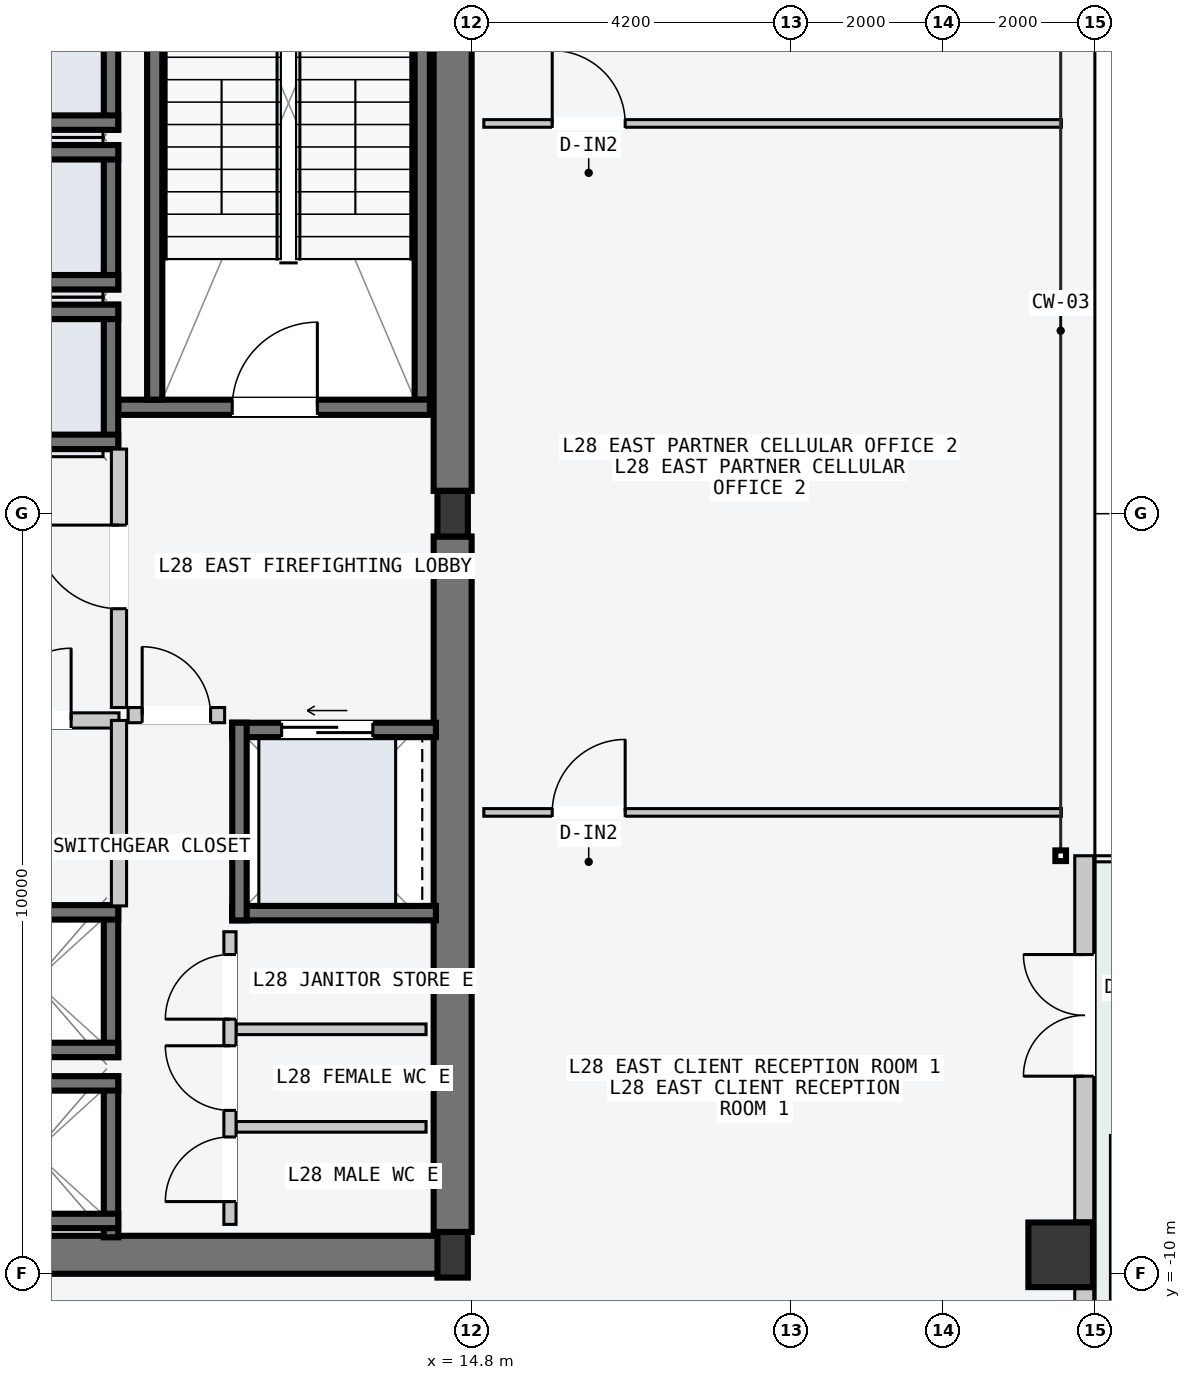
"""IFC4 building model, lengths in metres.
Left out: names, types, materials, properties, quantities, classifications, styles, units other than length and angle.
Written with IfcOpenShell. Run it as: python <this file> out.ifc"""

import sys

from ifc_helpers import new_model, si_unit, direction, frame, frame_2d, origin, origin_2d, place, context, subcontext, project, spatial, rectangle, hollow_rectangle, i_section, extrude, element, fill, save


model = new_model("IFC4")
c1 = context("Model", 3, precision=1e-05, world=origin(), true_north=direction((0.0, 1.0)))
c2 = subcontext(c1, "Body", "Model", "MODEL_VIEW")
j1 = project(units=[si_unit("LENGTHUNIT", "METRE"), si_unit("PLANEANGLEUNIT", "RADIAN")], contexts=[c1])
p1 = place(None, origin())
s1 = spatial("IfcSite", under=j1, at=p1, CompositionType="ELEMENT")
p2 = place(p1, origin())
s2 = spatial("IfcBuilding", under=s1, at=p2, CompositionType="ELEMENT")
p3 = place(p2, frame((0.0, 0.0, 109.8)))
s3 = spatial("IfcBuildingStorey", under=s2, at=p3, CompositionType="ELEMENT", Elevation=109.8)
p4 = place(p3, frame((8.07, -9.75, -0.2), z_axis=(0.0, 0.0, 1.0), x_axis=(1.0, 0.0, 0.0)))
e1 = element("IfcWall", 1, at=p4, inside=s3, PredefinedType="SHEAR", context=c2, shape_type="SweptSolid", body=[
    extrude(rectangle(XDim=6.46, YDim=0.5, at=frame_2d((3.23, 0.0))), origin(), (0.0, 0.0, 1.0), 3.6),
])
for number, where, z_axis, x_axis in (
    (2, (14.55, -9.45, -0.2), (0.0, 0.0, 1.0), (0.0, 1.0, 0.0)),
    (3, (14.55, 0.3, -0.2), (0.0, 0.0, 1.0), (0.0, 1.0, 0.0)),
):
    element("IfcWall", number, at=place(p3, frame(where, z_axis=z_axis, x_axis=x_axis)), inside=s3, PredefinedType="SHEAR", context=c2, shape_type="SweptSolid", body=[
        extrude(rectangle(XDim=9.15, YDim=0.5, at=frame_2d((4.575, 0.0))), origin(), (0.0, 0.0, 1.0), 3.6),
    ])
p5 = place(p3, frame((14.15, 1.5, -0.2), z_axis=(0.0, 0.0, 1.0), x_axis=(0.0, 1.0, 0.0)))
e4 = element("IfcWall", 4, at=p5, inside=s3, PredefinedType="SOLIDWALL", context=c2, shape_type="SweptSolid", body=[
    extrude(rectangle(XDim=7.8, YDim=0.2, at=frame_2d((3.9, 0.0))), origin(), (0.0, 0.0, 1.0), 3.6),
])
p6 = place(p3, frame((10.15, 1.4, -0.2), z_axis=(0.0, 0.0, 1.0), x_axis=(1.0, 0.0, 0.0)))
e5 = element("IfcWall", 5, at=p6, inside=s3, PredefinedType="SOLIDWALL", context=c2, shape_type="SweptSolid", body=[
    extrude(rectangle(XDim=4.1, YDim=0.2, at=frame_2d((2.05, 0.0))), origin(), (0.0, 0.0, 1.0), 3.6),
])
p7 = place(p6, frame((1.5, 0.0, 0.2)))
e6 = element("IfcOpeningElement", 6, at=p7, cuts=e5, PredefinedType="OPENING", context=c2, shape_type="SweptSolid", body=[
    extrude(rectangle(XDim=1.12, YDim=2.18, at=frame_2d((0.56, 1.09))), frame((0.0, 0.11, 0.0), z_axis=(0.0, -1.0, 0.0), x_axis=(1.0, 0.0, 0.0)), (0.0, 0.0, 1.0), 0.22),
])
p8 = place(p3, frame((10.63, 1.5, -0.2), z_axis=(0.0, 0.0, 1.0), x_axis=(0.0, 1.0, 0.0)))
e7 = element("IfcWall", 7, at=p8, inside=s3, PredefinedType="SOLIDWALL", context=c2, shape_type="SweptSolid", body=[
    extrude(rectangle(XDim=7.8, YDim=0.2, at=frame_2d((3.9, 0.0))), origin(), (0.0, 0.0, 1.0), 3.6),
])
for number, where, z_axis, x_axis in (
    (8, (14.55, -9.75, 0.0), (0.0, 0.0, 1.0), (1.0, 0.0, 0.0)),
    (9, (14.55, 0.0, 0.0), (0.0, 0.0, 1.0), (1.0, 0.0, 0.0)),
):
    element("IfcColumn", number, at=place(p3, frame(where, z_axis=z_axis, x_axis=x_axis)), inside=s3, PredefinedType="COLUMN", context=c2, shape_type="SweptSolid", body=[
        extrude(i_section(OverallWidth=0.4, OverallDepth=0.6, WebThickness=0.022, FlangeThickness=0.036, at=origin_2d()), origin(), (0.0, 0.0, 1.0), 3.6),
    ])
p9 = place(p3, frame((22.55, -9.75, 0.0), z_axis=(0.0, 0.0, 1.0), x_axis=(0.0, 1.0, 0.0)))
e10 = element("IfcColumn", 10, at=p9, inside=s3, PredefinedType="COLUMN", context=c2, shape_type="SweptSolid", body=[
    extrude(hollow_rectangle(XDim=0.85, YDim=0.85, WallThickness=0.04, at=origin_2d()), origin(), (0.0, 0.0, 1.0), 3.6),
])
p10 = place(p3, frame((22.86, -14.605, 0.0), z_axis=(0.0, 0.0, 1.0), x_axis=(0.0, 1.0, 0.0)))
e11 = element("IfcWall", 11, at=p10, inside=s3, PredefinedType="STANDARD", context=c2, shape_type="SweptSolid", body=[
    extrude(rectangle(XDim=4.41, YDim=0.25, at=frame_2d((2.205, 0.0))), origin(), (0.0, 0.0, 1.0), 3.4),
])
p11 = place(p10, frame((1.405, 0.0, 0.85)))
e12 = element("IfcOpeningElement", 12, at=p11, cuts=e11, PredefinedType="OPENING", context=c2, shape_type="SweptSolid", body=[
    extrude(rectangle(XDim=2.0, YDim=2.1, at=frame_2d((1.0, 1.05))), frame((0.0, 0.135, 0.0), z_axis=(0.0, -1.0, 0.0), x_axis=(1.0, 0.0, 0.0)), (0.0, 0.0, 1.0), 0.27),
])
p12 = place(p3, frame((22.86, -9.305, 0.0), z_axis=(0.0, 0.0, 1.0), x_axis=(0.0, 1.0, 0.0)))
e13 = element("IfcWall", 13, at=p12, inside=s3, PredefinedType="STANDARD", context=c2, shape_type="SweptSolid", body=[
    extrude(rectangle(XDim=4.805, YDim=0.25, at=frame_2d((2.402, 0.0))), origin(), (0.0, 0.0, 1.0), 3.4),
])
p13 = place(p12, frame((1.905, 0.0, 0.0)))
e14 = element("IfcOpeningElement", 14, at=p13, cuts=e13, PredefinedType="OPENING", context=c2, shape_type="SweptSolid", body=[
    extrude(rectangle(XDim=1.6, YDim=2.2, at=frame_2d((0.8, 1.1))), frame((0.0, 0.135, 0.0), z_axis=(0.0, -1.0, 0.0), x_axis=(1.0, 0.0, 0.0)), (0.0, 0.0, 1.0), 0.27),
])
p14 = place(p3, frame((10.055, 0.85, -0.2), z_axis=(0.0, 0.0, 1.0), x_axis=(0.0, 1.0, 0.0)))
e15 = element("IfcWall", 15, at=p14, inside=s3, PredefinedType="SOLIDWALL", context=c2, shape_type="SweptSolid", body=[
    extrude(rectangle(XDim=1.9, YDim=0.19, at=frame_2d((0.95, 0.0))), origin(), (0.0, 0.0, 1.0), 3.6),
])
for number, where, z_axis, x_axis in (
    (16, (7.95, 2.655, -0.2), (0.0, 0.0, 1.0), (1.0, 0.0, 0.0)),
    (17, (7.95, 0.945, -0.2), (0.0, 0.0, 1.0), (1.0, 0.0, 0.0)),
):
    element("IfcWall", number, at=place(p3, frame(where, z_axis=z_axis, x_axis=x_axis)), inside=s3, PredefinedType="SOLIDWALL", context=c2, shape_type="SweptSolid", body=[
        extrude(rectangle(XDim=2.2, YDim=0.19, at=frame_2d((1.1, 0.0))), origin(), (0.0, 0.0, 1.0), 3.6),
    ])
p15 = place(p3, frame((10.055, 2.95, -0.2), z_axis=(0.0, 0.0, 1.0), x_axis=(0.0, 1.0, 0.0)))
e18 = element("IfcWall", 18, at=p15, inside=s3, PredefinedType="SOLIDWALL", context=c2, shape_type="SweptSolid", body=[
    extrude(rectangle(XDim=1.9, YDim=0.19, at=frame_2d((0.95, 0.0))), origin(), (0.0, 0.0, 1.0), 3.6),
])
for number, where, z_axis, x_axis in (
    (19, (7.95, 4.755, -0.2), (0.0, 0.0, 1.0), (1.0, 0.0, 0.0)),
    (20, (7.95, 3.045, -0.2), (0.0, 0.0, 1.0), (1.0, 0.0, 0.0)),
):
    element("IfcWall", number, at=place(p3, frame(where, z_axis=z_axis, x_axis=x_axis)), inside=s3, PredefinedType="SOLIDWALL", context=c2, shape_type="SweptSolid", body=[
        extrude(rectangle(XDim=2.2, YDim=0.19, at=frame_2d((1.1, 0.0))), origin(), (0.0, 0.0, 1.0), 3.6),
    ])
p16 = place(p3, frame((10.055, 5.05, -0.2), z_axis=(0.0, 0.0, 1.0), x_axis=(0.0, 1.0, 0.0)))
e21 = element("IfcWall", 21, at=p16, inside=s3, PredefinedType="SOLIDWALL", context=c2, shape_type="SweptSolid", body=[
    extrude(rectangle(XDim=1.9, YDim=0.19, at=frame_2d((0.95, 0.0))), origin(), (0.0, 0.0, 1.0), 3.6),
])
p17 = place(p3, frame((7.95, 5.145, -0.2), z_axis=(0.0, 0.0, 1.0), x_axis=(1.0, 0.0, 0.0)))
e22 = element("IfcWall", 22, at=p17, inside=s3, PredefinedType="SOLIDWALL", context=c2, shape_type="SweptSolid", body=[
    extrude(rectangle(XDim=2.2, YDim=0.19, at=frame_2d((1.1, 0.0))), origin(), (0.0, 0.0, 1.0), 3.6),
])
p18 = place(p3, frame((10.055, -9.52, -0.2), z_axis=(0.0, 0.0, 1.0), x_axis=(0.0, 1.0, 0.0)))
e23 = element("IfcWall", 23, at=p18, inside=s3, PredefinedType="SOLIDWALL", context=c2, shape_type="SweptSolid", body=[
    extrude(rectangle(XDim=2.12, YDim=0.19, at=frame_2d((1.06, 0.0))), origin(), (0.0, 0.0, 1.0), 3.6),
])
for number, where, z_axis, x_axis in (
    (24, (7.95, -7.495, -0.2), (0.0, 0.0, 1.0), (1.0, 0.0, 0.0)),
    (25, (7.95, -9.305, -0.2), (0.0, 0.0, 1.0), (1.0, 0.0, 0.0)),
):
    element("IfcWall", number, at=place(p3, frame(where, z_axis=z_axis, x_axis=x_axis)), inside=s3, PredefinedType="SOLIDWALL", context=c2, shape_type="SweptSolid", body=[
        extrude(rectangle(XDim=2.2, YDim=0.19, at=frame_2d((1.1, 0.0))), origin(), (0.0, 0.0, 1.0), 3.6),
    ])
p19 = place(p3, frame((10.055, -7.15, -0.2), z_axis=(0.0, 0.0, 1.0), x_axis=(0.0, 1.0, 0.0)))
e26 = element("IfcWall", 26, at=p19, inside=s3, PredefinedType="SOLIDWALL", context=c2, shape_type="SweptSolid", body=[
    extrude(rectangle(XDim=2.0, YDim=0.19, at=frame_2d((1.0, 0.0))), origin(), (0.0, 0.0, 1.0), 3.6),
])
for number, where, z_axis, x_axis in (
    (27, (7.95, -5.245, -0.2), (0.0, 0.0, 1.0), (1.0, 0.0, 0.0)),
    (28, (7.95, -7.055, -0.2), (0.0, 0.0, 1.0), (1.0, 0.0, 0.0)),
):
    element("IfcWall", number, at=place(p3, frame(where, z_axis=z_axis, x_axis=x_axis)), inside=s3, PredefinedType="SOLIDWALL", context=c2, shape_type="SweptSolid", body=[
        extrude(rectangle(XDim=2.2, YDim=0.19, at=frame_2d((1.1, 0.0))), origin(), (0.0, 0.0, 1.0), 3.6),
    ])
p20 = place(p3, frame((11.65, -2.845, -0.2), z_axis=(0.0, 0.0, 1.0), x_axis=(1.0, 0.0, 0.0)))
e29 = element("IfcWall", 29, at=p20, inside=s3, PredefinedType="SOLIDWALL", context=c2, shape_type="SweptSolid", body=[
    extrude(rectangle(XDim=2.68, YDim=0.19, at=frame_2d((1.34, 0.0))), origin(), (0.0, 0.0, 1.0), 3.6),
])
p21 = place(p20, frame((0.65, 0.0, 0.2)))
e30 = element("IfcOpeningElement", 30, at=p21, cuts=e29, PredefinedType="OPENING", context=c2, shape_type="SweptSolid", body=[
    extrude(rectangle(XDim=1.2, YDim=2.2, at=frame_2d((0.6, 1.1))), frame((0.0, 0.105, 0.0), z_axis=(0.0, -1.0, 0.0), x_axis=(1.0, 0.0, 0.0)), (0.0, 0.0, 1.0), 0.21),
])
p22 = place(p3, frame((11.65, -5.255, -0.2), z_axis=(0.0, 0.0, 1.0), x_axis=(1.0, 0.0, 0.0)))
e31 = element("IfcWall", 31, at=p22, inside=s3, PredefinedType="SOLIDWALL", context=c2, shape_type="SweptSolid", body=[
    extrude(rectangle(XDim=2.68, YDim=0.19, at=frame_2d((1.34, 0.0))), origin(), (0.0, 0.0, 1.0), 3.6),
])
p23 = place(p3, frame((11.745, -5.35, -0.2), z_axis=(0.0, 0.0, 1.0), x_axis=(0.0, 1.0, 0.0)))
e32 = element("IfcWall", 32, at=p23, inside=s3, PredefinedType="SOLIDWALL", context=c2, shape_type="SweptSolid", body=[
    extrude(rectangle(XDim=2.6, YDim=0.19, at=frame_2d((1.3, 0.0))), origin(), (0.0, 0.0, 1.0), 3.6),
])
p24 = place(p3, frame((10.16, -2.55, 0.0), z_axis=(0.0, 0.0, 1.0), x_axis=(0.0, 1.0, 0.0)))
e33 = element("IfcWall", 33, at=p24, inside=s3, PredefinedType="PARTITIONING", context=c2, shape_type="SweptSolid", body=[
    extrude(rectangle(XDim=3.4, YDim=0.2, at=frame_2d((1.7, 0.0))), origin(), (0.0, 0.0, 1.0), 3.4),
])
p25 = place(p24, frame((1.3, 0.0, 0.0)))
e34 = element("IfcOpeningElement", 34, at=p25, cuts=e33, PredefinedType="OPENING", context=c2, shape_type="SweptSolid", body=[
    extrude(rectangle(XDim=1.1, YDim=2.15, at=frame_2d((0.55, 1.075))), frame((0.0, 0.11, 0.0), z_axis=(0.0, -1.0, 0.0), x_axis=(1.0, 0.0, 0.0)), (0.0, 0.0, 1.0), 0.22),
])
p26 = place(p3, frame((10.28, -2.65, 0.0), z_axis=(0.0, 0.0, 1.0), x_axis=(1.0, 0.0, 0.0)))
e35 = element("IfcWall", 35, at=p26, inside=s3, PredefinedType="PARTITIONING", context=c2, shape_type="SweptSolid", body=[
    extrude(rectangle(XDim=1.27, YDim=0.2, at=frame_2d((0.635, 0.0))), origin(), (0.0, 0.0, 1.0), 3.4),
])
p27 = place(p26, frame((0.185, 0.0, 0.0)))
e36 = element("IfcOpeningElement", 36, at=p27, cuts=e35, PredefinedType="OPENING", context=c2, shape_type="SweptSolid", body=[
    extrude(rectangle(XDim=0.9, YDim=2.15, at=frame_2d((0.45, 1.075))), frame((0.0, 0.11, 0.0), z_axis=(0.0, -1.0, 0.0), x_axis=(1.0, 0.0, 0.0)), (0.0, 0.0, 1.0), 0.22),
])
p28 = place(p3, frame((7.96, -2.72, 0.0), z_axis=(0.0, 0.0, 1.0), x_axis=(1.0, 0.0, 0.0)))
e37 = element("IfcWall", 37, at=p28, inside=s3, PredefinedType="PARTITIONING", context=c2, shape_type="SweptSolid", body=[
    extrude(rectangle(XDim=2.2, YDim=0.2, at=frame_2d((1.1, 0.0))), origin(), (0.0, 0.0, 1.0), 3.4),
])
p29 = place(p28, frame((0.62, 0.0, 0.0)))
e38 = element("IfcOpeningElement", 38, at=p29, cuts=e37, PredefinedType="OPENING", context=c2, shape_type="SweptSolid", body=[
    extrude(rectangle(XDim=0.95, YDim=2.1, at=frame_2d((0.475, 1.05))), frame((0.0, 0.11, 0.0), z_axis=(0.0, -1.0, 0.0), x_axis=(1.0, 0.0, 0.0)), (0.0, 0.0, 1.0), 0.22),
])
p30 = place(p3, frame((10.16, -5.16, 0.0), z_axis=(0.0, 0.0, 1.0), x_axis=(0.0, 1.0, 0.0)))
e39 = element("IfcWall", 39, at=p30, inside=s3, PredefinedType="PARTITIONING", context=c2, shape_type="SweptSolid", body=[
    extrude(rectangle(XDim=2.44, YDim=0.2, at=frame_2d((1.22, 0.0))), origin(), (0.0, 0.0, 1.0), 3.4),
])
for number, where, z_axis, x_axis in (
    (40, (11.7, -8.067, 0.0), (0.0, 0.0, 1.0), (1.0, 0.0, 0.0)),
    (41, (11.7, -6.783, 0.0), (0.0, 0.0, 1.0), (1.0, 0.0, 0.0)),
):
    element("IfcWall", number, at=place(p3, frame(where, z_axis=z_axis, x_axis=x_axis)), inside=s3, PredefinedType="PARTITIONING", context=c2, shape_type="SweptSolid", body=[
        extrude(rectangle(XDim=2.5, YDim=0.14, at=frame_2d((1.25, 0.0))), origin(), (0.0, 0.0, 1.0), 3.4),
    ])
p31 = place(p3, frame((11.62, -9.35, 0.0), z_axis=(0.0, 0.0, 1.0), x_axis=(0.0, 1.0, 0.0)))
e42 = element("IfcWall", 42, at=p31, inside=s3, PredefinedType="PARTITIONING", context=c2, shape_type="SweptSolid", body=[
    extrude(rectangle(XDim=3.85, YDim=0.16, at=frame_2d((1.925, 0.0))), origin(), (0.0, 0.0, 1.0), 3.4),
])
p32 = place(p31, frame((0.3, 0.0, 0.0)))
e43 = element("IfcOpeningElement", 43, at=p32, cuts=e42, PredefinedType="OPENING", context=c2, shape_type="SweptSolid", body=[
    extrude(rectangle(XDim=0.85, YDim=2.12, at=frame_2d((0.425, 1.06))), frame((0.0, 0.09, 0.0), z_axis=(0.0, -1.0, 0.0), x_axis=(1.0, 0.0, 0.0)), (0.0, 0.0, 1.0), 0.18),
])
p33 = place(p31, frame((1.5, 0.0, 0.0)))
e44 = element("IfcOpeningElement", 44, at=p33, cuts=e42, PredefinedType="OPENING", context=c2, shape_type="SweptSolid", body=[
    extrude(rectangle(XDim=0.85, YDim=2.12, at=frame_2d((0.425, 1.06))), frame((0.0, 0.09, 0.0), z_axis=(0.0, -1.0, 0.0), x_axis=(1.0, 0.0, 0.0)), (0.0, 0.0, 1.0), 0.18),
])
p34 = place(p31, frame((2.7, 0.0, 0.0)))
e45 = element("IfcOpeningElement", 45, at=p34, cuts=e42, PredefinedType="OPENING", context=c2, shape_type="SweptSolid", body=[
    extrude(rectangle(XDim=0.85, YDim=2.12, at=frame_2d((0.425, 1.06))), frame((0.0, 0.09, 0.0), z_axis=(0.0, -1.0, 0.0), x_axis=(1.0, 0.0, 0.0)), (0.0, 0.0, 1.0), 0.18),
])
p35 = place(p3, frame((14.96, -3.93, 0.0), z_axis=(0.0, 0.0, 1.0), x_axis=(1.0, 0.0, 0.0)))
e46 = element("IfcWall", 46, at=p35, inside=s3, PredefinedType="PARTITIONING", context=c2, shape_type="SweptSolid", body=[
    extrude(rectangle(XDim=7.6, YDim=0.1, at=frame_2d((3.8, 0.0))), origin(), (0.0, 0.0, 1.0), 3.4),
])
p36 = place(p35, frame((0.9, 0.0, 0.0)))
e47 = element("IfcOpeningElement", 47, at=p36, cuts=e46, PredefinedType="OPENING", context=c2, shape_type="SweptSolid", body=[
    extrude(rectangle(XDim=0.96, YDim=2.18, at=frame_2d((0.48, 1.09))), frame((0.0, 0.06, 0.0), z_axis=(0.0, -1.0, 0.0), x_axis=(1.0, 0.0, 0.0)), (0.0, 0.0, 1.0), 0.12),
])
p37 = place(p3, frame((14.96, 5.134, 0.0), z_axis=(0.0, 0.0, 1.0), x_axis=(1.0, 0.0, 0.0)))
e48 = element("IfcWall", 48, at=p37, inside=s3, PredefinedType="PARTITIONING", context=c2, shape_type="SweptSolid", body=[
    extrude(rectangle(XDim=7.6, YDim=0.1, at=frame_2d((3.8, 0.0))), origin(), (0.0, 0.0, 1.0), 3.4),
])
p38 = place(p37, frame((0.9, 0.0, 0.0)))
e49 = element("IfcOpeningElement", 49, at=p38, cuts=e48, PredefinedType="OPENING", context=c2, shape_type="SweptSolid", body=[
    extrude(rectangle(XDim=0.96, YDim=2.18, at=frame_2d((0.48, 1.09))), frame((0.0, 0.06, 0.0), z_axis=(0.0, -1.0, 0.0), x_axis=(1.0, 0.0, 0.0)), (0.0, 0.0, 1.0), 0.12),
])
p39 = place(p7, origin())
e50 = element("IfcDoor", 50, at=p39, inside=s3, OperationType="SINGLE_SWING_RIGHT", PredefinedType="DOOR", context=c2, shape_type="SweptSolid", body=[
    extrude(rectangle(XDim=1.12, YDim=2.18, at=frame_2d((0.56, 1.09))), frame((0.0, 0.025, 0.0), z_axis=(0.0, -1.0, 0.0), x_axis=(1.0, 0.0, 0.0)), (0.0, 0.0, 1.0), 0.05),
])
fill(e6, e50)
p40 = place(p13, origin())
e51 = element("IfcDoor", 51, at=p40, inside=s3, OperationType="DOUBLE_DOOR_SINGLE_SWING", PredefinedType="DOOR", context=c2, shape_type="SweptSolid", body=[
    extrude(rectangle(XDim=1.6, YDim=2.2, at=frame_2d((0.8, 1.1))), frame((0.0, 0.025, 0.0), z_axis=(0.0, -1.0, 0.0), x_axis=(1.0, 0.0, 0.0)), (0.0, 0.0, 1.0), 0.05),
])
fill(e14, e51)
p41 = place(p21, origin())
e52 = element("IfcDoor", 52, at=p41, inside=s3, OperationType="SLIDING_TO_LEFT", PredefinedType="DOOR", context=c2, shape_type="SweptSolid", body=[
    extrude(rectangle(XDim=1.2, YDim=2.2, at=frame_2d((0.6, 1.1))), frame((0.0, 0.025, 0.0), z_axis=(0.0, -1.0, 0.0), x_axis=(1.0, 0.0, 0.0)), (0.0, 0.0, 1.0), 0.05),
])
fill(e30, e52)
p42 = place(p25, origin())
e53 = element("IfcDoor", 53, at=p42, inside=s3, OperationType="SINGLE_SWING_RIGHT", PredefinedType="DOOR", context=c2, shape_type="SweptSolid", body=[
    extrude(rectangle(XDim=1.1, YDim=2.15, at=frame_2d((0.55, 1.075))), frame((0.0, 0.025, 0.0), z_axis=(0.0, -1.0, 0.0), x_axis=(1.0, 0.0, 0.0)), (0.0, 0.0, 1.0), 0.05),
])
fill(e34, e53)
p43 = place(p27, origin())
e54 = element("IfcDoor", 54, at=p43, inside=s3, OperationType="SINGLE_SWING_LEFT", PredefinedType="DOOR", context=c2, shape_type="SweptSolid", body=[
    extrude(rectangle(XDim=0.9, YDim=2.15, at=frame_2d((0.45, 1.075))), frame((0.0, 0.025, 0.0), z_axis=(0.0, -1.0, 0.0), x_axis=(1.0, 0.0, 0.0)), (0.0, 0.0, 1.0), 0.05),
])
fill(e36, e54)
p44 = place(p29, origin())
e55 = element("IfcDoor", 55, at=p44, inside=s3, OperationType="SINGLE_SWING_RIGHT", PredefinedType="DOOR", context=c2, shape_type="SweptSolid", body=[
    extrude(rectangle(XDim=0.95, YDim=2.1, at=frame_2d((0.475, 1.05))), frame((0.0, 0.025, 0.0), z_axis=(0.0, -1.0, 0.0), x_axis=(1.0, 0.0, 0.0)), (0.0, 0.0, 1.0), 0.05),
])
fill(e38, e55)
p45 = place(p32, origin())
e56 = element("IfcDoor", 56, at=p45, inside=s3, OperationType="SINGLE_SWING_LEFT", PredefinedType="DOOR", context=c2, shape_type="SweptSolid", body=[
    extrude(rectangle(XDim=0.85, YDim=2.12, at=frame_2d((0.425, 1.06))), frame((0.0, 0.025, 0.0), z_axis=(0.0, -1.0, 0.0), x_axis=(1.0, 0.0, 0.0)), (0.0, 0.0, 1.0), 0.05),
])
fill(e43, e56)
p46 = place(p33, origin())
e57 = element("IfcDoor", 57, at=p46, inside=s3, OperationType="SINGLE_SWING_RIGHT", PredefinedType="DOOR", context=c2, shape_type="SweptSolid", body=[
    extrude(rectangle(XDim=0.85, YDim=2.12, at=frame_2d((0.425, 1.06))), frame((0.0, 0.025, 0.0), z_axis=(0.0, -1.0, 0.0), x_axis=(1.0, 0.0, 0.0)), (0.0, 0.0, 1.0), 0.05),
])
fill(e44, e57)
p47 = place(p34, origin())
e58 = element("IfcDoor", 58, at=p47, inside=s3, OperationType="SINGLE_SWING_LEFT", PredefinedType="DOOR", context=c2, shape_type="SweptSolid", body=[
    extrude(rectangle(XDim=0.85, YDim=2.12, at=frame_2d((0.425, 1.06))), frame((0.0, 0.025, 0.0), z_axis=(0.0, -1.0, 0.0), x_axis=(1.0, 0.0, 0.0)), (0.0, 0.0, 1.0), 0.05),
])
fill(e45, e58)
p48 = place(p36, origin())
e59 = element("IfcDoor", 59, at=p48, inside=s3, OperationType="SINGLE_SWING_RIGHT", PredefinedType="DOOR", context=c2, shape_type="SweptSolid", body=[
    extrude(rectangle(XDim=0.96, YDim=2.18, at=frame_2d((0.48, 1.09))), frame((0.0, 0.025, 0.0), z_axis=(0.0, -1.0, 0.0), x_axis=(1.0, 0.0, 0.0)), (0.0, 0.0, 1.0), 0.05),
])
fill(e47, e59)
p49 = place(p38, origin())
e60 = element("IfcDoor", 60, at=p49, inside=s3, OperationType="SINGLE_SWING_LEFT", PredefinedType="DOOR", context=c2, shape_type="SweptSolid", body=[
    extrude(rectangle(XDim=0.96, YDim=2.18, at=frame_2d((0.48, 1.09))), frame((0.0, 0.025, 0.0), z_axis=(0.0, -1.0, 0.0), x_axis=(1.0, 0.0, 0.0)), (0.0, 0.0, 1.0), 0.05),
])
fill(e49, e60)
save(model, sys.argv[1])
